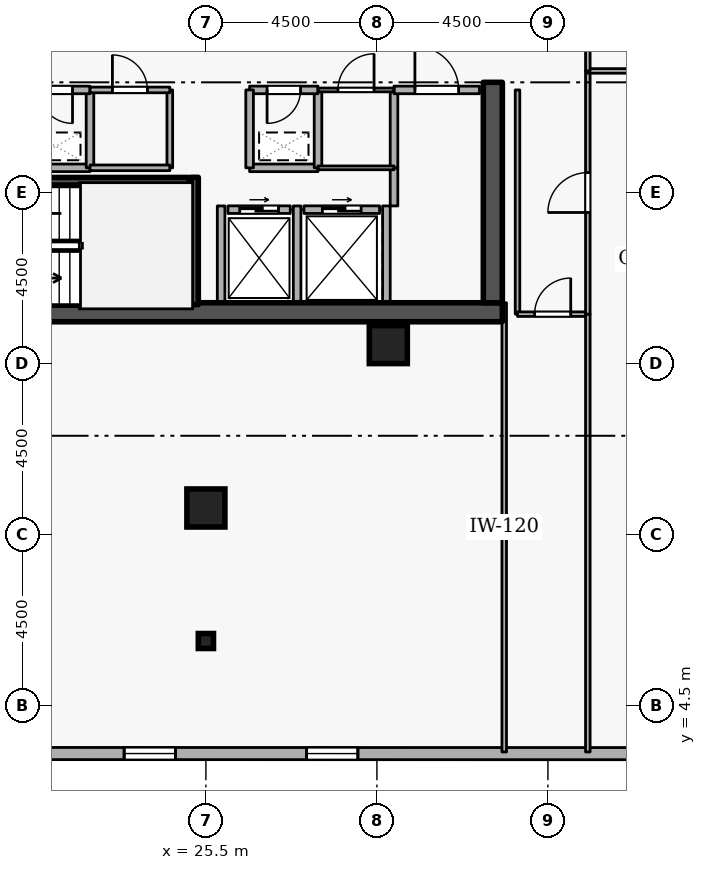
"""IFC4 building model, lengths in metres.
Left out: names, types, materials, properties, quantities, classifications, styles, units other than length and angle.
Written with IfcOpenShell. Run it as: python <this file> out.ifc"""

import sys

from ifc_helpers import new_model, si_unit, direction, frame, frame_2d, origin, origin_2d, place, context, subcontext, project, spatial, rectangle, i_section, extrude, element, fill, save


model = new_model("IFC4")
c1 = context("Model", 3, precision=1e-05, world=origin(), true_north=direction((0.0, 1.0)))
c2 = subcontext(c1, "Body", "Model", "MODEL_VIEW")
j1 = project(units=[si_unit("LENGTHUNIT", "METRE"), si_unit("PLANEANGLEUNIT", "RADIAN")], contexts=[c1])
p1 = place(None, origin())
s1 = spatial("IfcSite", under=j1, at=p1, CompositionType="ELEMENT")
p2 = place(p1, origin())
s2 = spatial("IfcBuilding", under=s1, at=p2, CompositionType="ELEMENT")
p3 = place(p2, frame((0.0, 0.0, 251.1)))
s3 = spatial("IfcBuildingStorey", under=s2, at=p3, CompositionType="ELEMENT", Elevation=251.1)
p4 = place(p3, frame((17.7, 14.85, 0.0), z_axis=(0.0, 0.0, 1.0), x_axis=(1.0, 0.0, 0.0)))
e1 = element("IfcWall", 1, at=p4, inside=s3, PredefinedType="SHEAR", context=c2, shape_type="SweptSolid", body=[
    extrude(rectangle(XDim=15.6, YDim=0.5, at=frame_2d((7.8, 0.0))), origin(), (0.0, 0.0, 1.0), 3.6),
])
p5 = place(p3, frame((33.05, 15.1, 0.0), z_axis=(0.0, 0.0, 1.0), x_axis=(0.0, 1.0, 0.0)))
e2 = element("IfcWall", 2, at=p5, inside=s3, PredefinedType="SHEAR", context=c2, shape_type="SweptSolid", body=[
    extrude(rectangle(XDim=5.8, YDim=0.5, at=frame_2d((2.9, 0.0))), origin(), (0.0, 0.0, 1.0), 3.6),
])
for number, where, z_axis, x_axis in (
    (3, (25.5, 9.7, 0.0), (0.0, 0.0, 1.0), (1.0, 0.0, 0.0)),
    (4, (30.3, 14.0, 0.0), (0.0, 0.0, 1.0), (1.0, 0.0, 0.0)),
):
    element("IfcColumn", number, at=place(p3, frame(where, z_axis=z_axis, x_axis=x_axis)), inside=s3, PredefinedType="COLUMN", context=c2, shape_type="SweptSolid", body=[
        extrude(rectangle(XDim=1.0, YDim=1.0, at=origin_2d()), origin(), (0.0, 0.0, 1.0), 3.6),
    ])
p6 = place(p3, frame((25.5, 6.2, 0.0), z_axis=(0.0, 0.0, 1.0), x_axis=(1.0, 0.0, 0.0)))
e5 = element("IfcColumn", 5, at=p6, inside=s3, PredefinedType="COLUMN", context=c2, shape_type="SweptSolid", body=[
    extrude(i_section(OverallWidth=0.399, OverallDepth=0.394, WebThickness=0.023, FlangeThickness=0.037, FilletRadius=0.015, at=origin_2d()), origin(), (0.0, 0.0, 1.0), 3.6),
])
p7 = place(p3, frame((6.249, 3.242, 0.0), z_axis=(0.0, 0.0, 1.0), x_axis=(0.999999983007, -0.000184351399, 0.0)))
e6 = element("IfcWall", 6, at=p7, inside=s3, PredefinedType="STANDARD", context=c2, shape_type="SweptSolid", body=[
    extrude(rectangle(XDim=34.432, YDim=0.32, at=frame_2d((17.216, 0.0))), origin(), (0.0, 0.0, 1.0), 2.22),
])
p8 = place(p7, frame((2.7, 0.0, 0.72)))
e7 = element("IfcOpeningElement", 7, at=p8, cuts=e6, PredefinedType="OPENING", context=c2, shape_type="SweptSolid", body=[
    extrude(rectangle(XDim=1.35, YDim=1.05, at=frame_2d((0.675, 0.525))), frame((0.0, 0.17, 0.0), z_axis=(0.0, -1.0, 0.0), x_axis=(1.0, 0.0, 0.0)), (0.0, 0.0, 1.0), 0.34),
])
p9 = place(p7, frame((12.3, 0.0, 0.72)))
e8 = element("IfcOpeningElement", 8, at=p9, cuts=e6, PredefinedType="OPENING", context=c2, shape_type="SweptSolid", body=[
    extrude(rectangle(XDim=1.35, YDim=1.05, at=frame_2d((0.675, 0.525))), frame((0.0, 0.17, 0.0), z_axis=(0.0, -1.0, 0.0), x_axis=(1.0, 0.0, 0.0)), (0.0, 0.0, 1.0), 0.34),
])
p10 = place(p7, frame((17.1, 0.0, 0.72)))
e9 = element("IfcOpeningElement", 9, at=p10, cuts=e6, PredefinedType="OPENING", context=c2, shape_type="SweptSolid", body=[
    extrude(rectangle(XDim=1.35, YDim=1.05, at=frame_2d((0.675, 0.525))), frame((0.0, 0.17, 0.0), z_axis=(0.0, -1.0, 0.0), x_axis=(1.0, 0.0, 0.0)), (0.0, 0.0, 1.0), 0.34),
])
p11 = place(p7, frame((21.9, 0.0, 0.72)))
e10 = element("IfcOpeningElement", 10, at=p11, cuts=e6, PredefinedType="OPENING", context=c2, shape_type="SweptSolid", body=[
    extrude(rectangle(XDim=1.35, YDim=1.05, at=frame_2d((0.675, 0.525))), frame((0.0, 0.17, 0.0), z_axis=(0.0, -1.0, 0.0), x_axis=(1.0, 0.0, 0.0)), (0.0, 0.0, 1.0), 0.34),
])
p12 = place(p3, frame((26.08, 17.55, 0.0), z_axis=(0.0, 0.0, 1.0), x_axis=(1.0, 0.0, 0.0)))
e11 = element("IfcWall", 11, at=p12, inside=s3, PredefinedType="STANDARD", context=c2, shape_type="SweptSolid", body=[
    extrude(rectangle(XDim=1.64, YDim=0.2, at=frame_2d((0.82, 0.0))), origin(), (0.0, 0.0, 1.0), 3.32),
])
p13 = place(p12, frame((0.31, 0.0, 0.0)))
e12 = element("IfcOpeningElement", 12, at=p13, cuts=e11, PredefinedType="OPENING", context=c2, shape_type="SweptSolid", body=[
    extrude(rectangle(XDim=1.02, YDim=2.06, at=frame_2d((0.51, 1.03))), frame((0.0, 0.11, 0.0), z_axis=(0.0, -1.0, 0.0), x_axis=(1.0, 0.0, 0.0)), (0.0, 0.0, 1.0), 0.22),
])
p14 = place(p3, frame((28.08, 17.55, 0.0), z_axis=(0.0, 0.0, 1.0), x_axis=(1.0, 0.0, 0.0)))
e13 = element("IfcWall", 13, at=p14, inside=s3, PredefinedType="STANDARD", context=c2, shape_type="SweptSolid", body=[
    extrude(rectangle(XDim=1.99, YDim=0.2, at=frame_2d((0.995, 0.0))), origin(), (0.0, 0.0, 1.0), 3.32),
])
p15 = place(p14, frame((0.485, 0.0, 0.0)))
e14 = element("IfcOpeningElement", 14, at=p15, cuts=e13, PredefinedType="OPENING", context=c2, shape_type="SweptSolid", body=[
    extrude(rectangle(XDim=1.02, YDim=2.06, at=frame_2d((0.51, 1.03))), frame((0.0, 0.11, 0.0), z_axis=(0.0, -1.0, 0.0), x_axis=(1.0, 0.0, 0.0)), (0.0, 0.0, 1.0), 0.22),
])
p16 = place(p3, frame((27.9, 15.112, 0.0), z_axis=(0.0, 0.0, 1.0), x_axis=(0.0, 1.0, 0.0)))
e15 = element("IfcWall", 15, at=p16, inside=s3, PredefinedType="STANDARD", context=c2, shape_type="SweptSolid", body=[
    extrude(rectangle(XDim=2.536, YDim=0.2, at=frame_2d((1.268, 0.0))), origin(), (0.0, 0.0, 1.0), 3.32),
])
p17 = place(p3, frame((25.9, 15.112, 0.0), z_axis=(0.0, 0.0, 1.0), x_axis=(0.0, 1.0, 0.0)))
e16 = element("IfcWall", 16, at=p17, inside=s3, PredefinedType="STANDARD", context=c2, shape_type="SweptSolid", body=[
    extrude(rectangle(XDim=2.536, YDim=0.2, at=frame_2d((1.268, 0.0))), origin(), (0.0, 0.0, 1.0), 1.785),
])
p18 = place(p3, frame((30.25, 15.112, 0.0), z_axis=(0.0, 0.0, 1.0), x_axis=(0.0, 1.0, 0.0)))
e17 = element("IfcWall", 17, at=p18, inside=s3, PredefinedType="STANDARD", context=c2, shape_type="SweptSolid", body=[
    extrude(rectangle(XDim=2.536, YDim=0.2, at=frame_2d((1.268, 0.0))), origin(), (0.0, 0.0, 1.0), 3.32),
])
p19 = place(p3, frame((25.2, 18.4, 0.0), z_axis=(0.0, 0.0, 1.0), x_axis=(0.0, -1.0, 0.0)))
e18 = element("IfcWall", 18, at=p19, inside=s3, PredefinedType="SHEAR", context=c2, shape_type="SweptSolid", body=[
    extrude(rectangle(XDim=3.35, YDim=0.2, at=frame_2d((1.675, 0.0))), origin(), (0.0, 0.0, 1.0), 3.6),
])
p20 = place(p3, frame((25.05, 18.297, 0.0), z_axis=(0.0, 0.0, 1.0), x_axis=(-1.0, 0.0, 0.0)))
e19 = element("IfcWall", 19, at=p20, inside=s3, PredefinedType="SHEAR", context=c2, shape_type="SweptSolid", body=[
    extrude(rectangle(XDim=7.1, YDim=0.2, at=frame_2d((3.55, 0.0))), origin(), (0.0, 0.0, 1.0), 3.6),
])
p21 = place(p3, frame((26.65, 18.65, 0.0), z_axis=(0.0, 0.0, 1.0), x_axis=(1.0, 0.0, 0.0)))
e20 = element("IfcWall", 20, at=p21, inside=s3, PredefinedType="STANDARD", context=c2, shape_type="SweptSolid", body=[
    extrude(rectangle(XDim=1.8, YDim=0.2, at=frame_2d((0.9, 0.0))), origin(), (0.0, 0.0, 1.0), 3.32),
])
p22 = place(p3, frame((28.45, 18.65, 0.0), z_axis=(0.0, 0.0, 1.0), x_axis=(0.0, 1.0, 0.0)))
e21 = element("IfcWall", 21, at=p22, inside=s3, PredefinedType="STANDARD", context=c2, shape_type="SweptSolid", body=[
    extrude(rectangle(XDim=2.05, YDim=0.2, at=frame_2d((1.025, 0.0))), origin(), (0.0, 0.0, 1.0), 3.32),
])
p23 = place(p3, frame((28.45, 20.7, 0.0), z_axis=(0.0, 0.0, 1.0), x_axis=(-1.0, 0.0, 0.0)))
e22 = element("IfcWall", 22, at=p23, inside=s3, PredefinedType="STANDARD", context=c2, shape_type="SweptSolid", body=[
    extrude(rectangle(XDim=1.8, YDim=0.2, at=frame_2d((0.9, 0.0))), origin(), (0.0, 0.0, 1.0), 3.32),
])
p24 = place(p23, frame((0.46, 0.0, 0.0)))
e23 = element("IfcOpeningElement", 23, at=p24, cuts=e22, PredefinedType="OPENING", context=c2, shape_type="SweptSolid", body=[
    extrude(rectangle(XDim=0.88, YDim=2.04, at=frame_2d((0.44, 1.02))), frame((0.0, 0.11, 0.0), z_axis=(0.0, -1.0, 0.0), x_axis=(1.0, 0.0, 0.0)), (0.0, 0.0, 1.0), 0.22),
])
p25 = place(p3, frame((26.65, 20.7, 0.0), z_axis=(0.0, 0.0, 1.0), x_axis=(0.0, -1.0, 0.0)))
e24 = element("IfcWall", 24, at=p25, inside=s3, PredefinedType="STANDARD", context=c2, shape_type="SweptSolid", body=[
    extrude(rectangle(XDim=2.05, YDim=0.2, at=frame_2d((1.025, 0.0))), origin(), (0.0, 0.0, 1.0), 3.32),
])
p26 = place(p3, frame((20.65, 18.65, 0.0), z_axis=(0.0, 0.0, 1.0), x_axis=(1.0, 0.0, 0.0)))
e25 = element("IfcWall", 25, at=p26, inside=s3, PredefinedType="STANDARD", context=c2, shape_type="SweptSolid", body=[
    extrude(rectangle(XDim=1.8, YDim=0.2, at=frame_2d((0.9, 0.0))), origin(), (0.0, 0.0, 1.0), 3.32),
])
p27 = place(p3, frame((22.45, 18.65, 0.0), z_axis=(0.0, 0.0, 1.0), x_axis=(0.0, 1.0, 0.0)))
e26 = element("IfcWall", 26, at=p27, inside=s3, PredefinedType="STANDARD", context=c2, shape_type="SweptSolid", body=[
    extrude(rectangle(XDim=2.05, YDim=0.2, at=frame_2d((1.025, 0.0))), origin(), (0.0, 0.0, 1.0), 3.32),
])
p28 = place(p3, frame((22.45, 20.7, 0.0), z_axis=(0.0, 0.0, 1.0), x_axis=(-1.0, 0.0, 0.0)))
e27 = element("IfcWall", 27, at=p28, inside=s3, PredefinedType="STANDARD", context=c2, shape_type="SweptSolid", body=[
    extrude(rectangle(XDim=1.8, YDim=0.2, at=frame_2d((0.9, 0.0))), origin(), (0.0, 0.0, 1.0), 3.32),
])
p29 = place(p28, frame((0.46, 0.0, 0.0)))
e28 = element("IfcOpeningElement", 28, at=p29, cuts=e27, PredefinedType="OPENING", context=c2, shape_type="SweptSolid", body=[
    extrude(rectangle(XDim=0.88, YDim=2.04, at=frame_2d((0.44, 1.02))), frame((0.0, 0.11, 0.0), z_axis=(0.0, -1.0, 0.0), x_axis=(1.0, 0.0, 0.0)), (0.0, 0.0, 1.0), 0.22),
])
p30 = place(p3, frame((30.45, 17.648, 0.0), z_axis=(0.0, 0.0, 1.0), x_axis=(0.0, 1.0, 0.0)))
e29 = element("IfcWall", 29, at=p30, inside=s3, PredefinedType="STANDARD", context=c2, shape_type="SweptSolid", body=[
    extrude(rectangle(XDim=1.002, YDim=0.2, at=frame_2d((0.501, 0.0))), origin(), (0.0, 0.0, 1.0), 3.32),
])
p31 = place(p3, frame((30.45, 18.65, 0.0), z_axis=(0.0, 0.0, 1.0), x_axis=(0.0, 1.0, 0.0)))
e30 = element("IfcWall", 30, at=p31, inside=s3, PredefinedType="STANDARD", context=c2, shape_type="SweptSolid", body=[
    extrude(rectangle(XDim=2.05, YDim=0.2, at=frame_2d((1.025, 0.0))), origin(), (0.0, 0.0, 1.0), 3.32),
])
p32 = place(p3, frame((30.45, 20.7, 0.0), z_axis=(0.0, 0.0, 1.0), x_axis=(1.0, 0.0, 0.0)))
e31 = element("IfcWall", 31, at=p32, inside=s3, PredefinedType="STANDARD", context=c2, shape_type="SweptSolid", body=[
    extrude(rectangle(XDim=2.25, YDim=0.2, at=frame_2d((1.125, 0.0))), origin(), (0.0, 0.0, 1.0), 3.32),
])
p33 = place(p32, frame((0.55, 0.0, 0.0)))
e32 = element("IfcOpeningElement", 32, at=p33, cuts=e31, PredefinedType="OPENING", context=c2, shape_type="SweptSolid", body=[
    extrude(rectangle(XDim=1.15, YDim=2.1, at=frame_2d((0.575, 1.05))), frame((0.0, 0.11, 0.0), z_axis=(0.0, -1.0, 0.0), x_axis=(1.0, 0.0, 0.0)), (0.0, 0.0, 1.0), 0.22),
])
p34 = place(p3, frame((24.55, 20.7, 0.0), z_axis=(0.0, 0.0, 1.0), x_axis=(0.0, -1.0, 0.0)))
e33 = element("IfcWall", 33, at=p34, inside=s3, PredefinedType="PARTITIONING", context=c2, shape_type="SweptSolid", body=[
    extrude(rectangle(XDim=2.05, YDim=0.15, at=frame_2d((1.025, 0.0))), origin(), (0.0, 0.0, 1.0), 3.32),
])
p35 = place(p3, frame((24.55, 18.65, 0.0), z_axis=(0.0, 0.0, 1.0), x_axis=(-1.0, 0.0, 0.0)))
e34 = element("IfcWall", 34, at=p35, inside=s3, PredefinedType="PARTITIONING", context=c2, shape_type="SweptSolid", body=[
    extrude(rectangle(XDim=2.1, YDim=0.15, at=frame_2d((1.05, 0.0))), origin(), (0.0, 0.0, 1.0), 3.32),
])
p36 = place(p3, frame((22.45, 20.7, 0.0), z_axis=(0.0, 0.0, 1.0), x_axis=(1.0, 0.0, 0.0)))
e35 = element("IfcWall", 35, at=p36, inside=s3, PredefinedType="PARTITIONING", context=c2, shape_type="SweptSolid", body=[
    extrude(rectangle(XDim=2.1, YDim=0.15, at=frame_2d((1.05, 0.0))), origin(), (0.0, 0.0, 1.0), 3.32),
])
p37 = place(p36, frame((0.59, 0.0, 0.0)))
e36 = element("IfcOpeningElement", 36, at=p37, cuts=e35, PredefinedType="OPENING", context=c2, shape_type="SweptSolid", body=[
    extrude(rectangle(XDim=0.92, YDim=2.08, at=frame_2d((0.46, 1.04))), frame((0.0, 0.085, 0.0), z_axis=(0.0, -1.0, 0.0), x_axis=(1.0, 0.0, 0.0)), (0.0, 0.0, 1.0), 0.17),
])
p38 = place(p3, frame((30.45, 18.65, 0.0), z_axis=(0.0, 0.0, 1.0), x_axis=(-1.0, 0.0, 0.0)))
e37 = element("IfcWall", 37, at=p38, inside=s3, PredefinedType="PARTITIONING", context=c2, shape_type="SweptSolid", body=[
    extrude(rectangle(XDim=2.0, YDim=0.1, at=frame_2d((1.0, 0.0))), origin(), (0.0, 0.0, 1.0), 3.32),
])
p39 = place(p3, frame((28.45, 20.7, 0.0), z_axis=(0.0, 0.0, 1.0), x_axis=(1.0, 0.0, 0.0)))
e38 = element("IfcWall", 38, at=p39, inside=s3, PredefinedType="PARTITIONING", context=c2, shape_type="SweptSolid", body=[
    extrude(rectangle(XDim=2.0, YDim=0.1, at=frame_2d((1.0, 0.0))), origin(), (0.0, 0.0, 1.0), 3.32),
])
p40 = place(p39, frame((0.525, 0.0, 0.0)))
e39 = element("IfcOpeningElement", 39, at=p40, cuts=e38, PredefinedType="OPENING", context=c2, shape_type="SweptSolid", body=[
    extrude(rectangle(XDim=0.95, YDim=2.1, at=frame_2d((0.475, 1.05))), frame((0.0, 0.06, 0.0), z_axis=(0.0, -1.0, 0.0), x_axis=(1.0, 0.0, 0.0)), (0.0, 0.0, 1.0), 0.12),
])
p41 = place(p3, frame((33.7, 20.7, 0.0), z_axis=(0.0, 0.0, 1.0), x_axis=(0.0, -1.0, 0.0)))
e40 = element("IfcWall", 40, at=p41, inside=s3, PredefinedType="PARTITIONING", context=c2, shape_type="SweptSolid", body=[
    extrude(rectangle(XDim=5.9, YDim=0.12, at=frame_2d((2.95, 0.0))), origin(), (0.0, 0.0, 1.0), 3.32),
])
p42 = place(p3, frame((33.7, 14.8, 0.0), z_axis=(0.0, 0.0, 1.0), x_axis=(1.0, 0.0, 0.0)))
e41 = element("IfcWall", 41, at=p42, inside=s3, PredefinedType="PARTITIONING", context=c2, shape_type="SweptSolid", body=[
    extrude(rectangle(XDim=1.85, YDim=0.12, at=frame_2d((0.925, 0.0))), origin(), (0.0, 0.0, 1.0), 3.32),
])
p43 = place(p42, frame((0.45, 0.0, 0.0)))
e42 = element("IfcOpeningElement", 42, at=p43, cuts=e41, PredefinedType="OPENING", context=c2, shape_type="SweptSolid", body=[
    extrude(rectangle(XDim=0.95, YDim=2.1, at=frame_2d((0.475, 1.05))), frame((0.0, 0.07, 0.0), z_axis=(0.0, -1.0, 0.0), x_axis=(1.0, 0.0, 0.0)), (0.0, 0.0, 1.0), 0.14),
])
p44 = place(p3, frame((35.55, 14.8, 0.0), z_axis=(0.0, 0.0, 1.0), x_axis=(0.0, -1.0, 0.0)))
e43 = element("IfcWall", 43, at=p44, inside=s3, PredefinedType="PARTITIONING", context=c2, shape_type="SweptSolid", body=[
    extrude(rectangle(XDim=11.52, YDim=0.12, at=frame_2d((5.76, 0.0))), origin(), (0.0, 0.0, 1.0), 3.32),
])
p45 = place(p3, frame((33.35, 3.28, 0.0), z_axis=(0.0, 0.0, 1.0), x_axis=(0.0, 1.0, 0.0)))
e44 = element("IfcWall", 44, at=p45, inside=s3, PredefinedType="PARTITIONING", context=c2, shape_type="SweptSolid", body=[
    extrude(rectangle(XDim=11.82, YDim=0.12, at=frame_2d((5.91, 0.0))), origin(), (0.0, 0.0, 1.0), 2.525),
])
p46 = place(p3, frame((35.55, 14.8, 0.0), z_axis=(0.0, 0.0, 1.0), x_axis=(0.0, 1.0, 0.0)))
e45 = element("IfcWall", 45, at=p46, inside=s3, PredefinedType="PARTITIONING", context=c2, shape_type="SweptSolid", body=[
    extrude(rectangle(XDim=6.4, YDim=0.12, at=frame_2d((3.2, 0.0))), origin(), (0.0, 0.0, 1.0), 3.32),
])
p47 = place(p46, frame((2.675, 0.0, 0.0)))
e46 = element("IfcOpeningElement", 46, at=p47, cuts=e45, PredefinedType="OPENING", context=c2, shape_type="SweptSolid", body=[
    extrude(rectangle(XDim=1.05, YDim=2.1, at=frame_2d((0.525, 1.05))), frame((0.0, 0.07, 0.0), z_axis=(0.0, -1.0, 0.0), x_axis=(1.0, 0.0, 0.0)), (0.0, 0.0, 1.0), 0.14),
])
p48 = place(p3, frame((35.55, 21.2, 0.0), z_axis=(0.0, 0.0, 1.0), x_axis=(1.0, 0.0, 0.0)))
e47 = element("IfcWall", 47, at=p48, inside=s3, PredefinedType="PARTITIONING", context=c2, shape_type="SweptSolid", body=[
    extrude(rectangle(XDim=7.67, YDim=0.12, at=frame_2d((3.835, 0.0))), origin(), (0.0, 0.0, 1.0), 3.32),
])
p49 = place(p3, frame((35.55, 21.2, 0.0), z_axis=(0.0, 0.0, 1.0), x_axis=(0.0, 1.0, 0.0)))
e48 = element("IfcWall", 48, at=p49, inside=s3, PredefinedType="PARTITIONING", context=c2, shape_type="SweptSolid", body=[
    extrude(rectangle(XDim=5.4, YDim=0.12, at=frame_2d((2.7, 0.0))), origin(), (0.0, 0.0, 1.0), 3.32),
])
p50 = place(p49, frame((2.225, 0.0, 0.0)))
e49 = element("IfcOpeningElement", 49, at=p50, cuts=e48, PredefinedType="OPENING", context=c2, shape_type="SweptSolid", body=[
    extrude(rectangle(XDim=0.95, YDim=2.1, at=frame_2d((0.475, 1.05))), frame((0.0, 0.07, 0.0), z_axis=(0.0, -1.0, 0.0), x_axis=(1.0, 0.0, 0.0)), (0.0, 0.0, 1.0), 0.14),
])
p51 = place(p10, origin())
e50 = element("IfcWindow", 50, at=p51, inside=s3, PartitioningType="SINGLE_PANEL", PredefinedType="WINDOW", context=c2, shape_type="SweptSolid", body=[
    extrude(rectangle(XDim=1.35, YDim=1.05, at=frame_2d((0.675, 0.525))), frame((0.0, 0.03, 0.0), z_axis=(0.0, -1.0, 0.0), x_axis=(1.0, 0.0, 0.0)), (0.0, 0.0, 1.0), 0.06),
])
fill(e9, e50)
p52 = place(p11, origin())
e51 = element("IfcWindow", 51, at=p52, inside=s3, PartitioningType="SINGLE_PANEL", PredefinedType="WINDOW", context=c2, shape_type="SweptSolid", body=[
    extrude(rectangle(XDim=1.35, YDim=1.05, at=frame_2d((0.675, 0.525))), frame((0.0, 0.03, 0.0), z_axis=(0.0, -1.0, 0.0), x_axis=(1.0, 0.0, 0.0)), (0.0, 0.0, 1.0), 0.06),
])
fill(e10, e51)
p53 = place(p13, origin())
e52 = element("IfcDoor", 52, at=p53, inside=s3, OperationType="SLIDING_TO_LEFT", PredefinedType="DOOR", context=c2, shape_type="SweptSolid", body=[
    extrude(rectangle(XDim=1.02, YDim=2.06, at=frame_2d((0.51, 1.03))), frame((0.0, 0.025, 0.0), z_axis=(0.0, -1.0, 0.0), x_axis=(1.0, 0.0, 0.0)), (0.0, 0.0, 1.0), 0.05),
])
fill(e12, e52)
p54 = place(p15, origin())
e53 = element("IfcDoor", 53, at=p54, inside=s3, OperationType="SLIDING_TO_LEFT", PredefinedType="DOOR", context=c2, shape_type="SweptSolid", body=[
    extrude(rectangle(XDim=1.02, YDim=2.06, at=frame_2d((0.51, 1.03))), frame((0.0, 0.025, 0.0), z_axis=(0.0, -1.0, 0.0), x_axis=(1.0, 0.0, 0.0)), (0.0, 0.0, 1.0), 0.05),
])
fill(e14, e53)
p55 = place(p24, origin())
e54 = element("IfcDoor", 54, at=p55, inside=s3, OperationType="SINGLE_SWING_RIGHT", PredefinedType="DOOR", context=c2, shape_type="SweptSolid", body=[
    extrude(rectangle(XDim=0.88, YDim=2.04, at=frame_2d((0.44, 1.02))), frame((0.0, 0.025, 0.0), z_axis=(0.0, -1.0, 0.0), x_axis=(1.0, 0.0, 0.0)), (0.0, 0.0, 1.0), 0.05),
])
fill(e23, e54)
p56 = place(p29, origin())
e55 = element("IfcDoor", 55, at=p56, inside=s3, OperationType="SINGLE_SWING_LEFT", PredefinedType="DOOR", context=c2, shape_type="SweptSolid", body=[
    extrude(rectangle(XDim=0.88, YDim=2.04, at=frame_2d((0.44, 1.02))), frame((0.0, 0.025, 0.0), z_axis=(0.0, -1.0, 0.0), x_axis=(1.0, 0.0, 0.0)), (0.0, 0.0, 1.0), 0.05),
])
fill(e28, e55)
p57 = place(p37, origin())
e56 = element("IfcDoor", 56, at=p57, inside=s3, OperationType="SINGLE_SWING_LEFT", PredefinedType="DOOR", context=c2, shape_type="SweptSolid", body=[
    extrude(rectangle(XDim=0.92, YDim=2.08, at=frame_2d((0.46, 1.04))), frame((0.0, 0.025, 0.0), z_axis=(0.0, -1.0, 0.0), x_axis=(1.0, 0.0, 0.0)), (0.0, 0.0, 1.0), 0.05),
])
fill(e36, e56)
p58 = place(p40, origin())
e57 = element("IfcDoor", 57, at=p58, inside=s3, OperationType="SINGLE_SWING_RIGHT", PredefinedType="DOOR", context=c2, shape_type="SweptSolid", body=[
    extrude(rectangle(XDim=0.95, YDim=2.1, at=frame_2d((0.475, 1.05))), frame((0.0, 0.025, 0.0), z_axis=(0.0, -1.0, 0.0), x_axis=(1.0, 0.0, 0.0)), (0.0, 0.0, 1.0), 0.05),
])
fill(e39, e57)
p59 = place(p33, origin())
e58 = element("IfcDoor", 58, at=p59, inside=s3, OperationType="SINGLE_SWING_LEFT", PredefinedType="DOOR", context=c2, shape_type="SweptSolid", body=[
    extrude(rectangle(XDim=1.15, YDim=2.1, at=frame_2d((0.575, 1.05))), frame((0.0, 0.025, 0.0), z_axis=(0.0, -1.0, 0.0), x_axis=(1.0, 0.0, 0.0)), (0.0, 0.0, 1.0), 0.05),
])
fill(e32, e58)
p60 = place(p43, origin())
e59 = element("IfcDoor", 59, at=p60, inside=s3, OperationType="SINGLE_SWING_RIGHT", PredefinedType="DOOR", context=c2, shape_type="SweptSolid", body=[
    extrude(rectangle(XDim=0.95, YDim=2.1, at=frame_2d((0.475, 1.05))), frame((0.0, 0.025, 0.0), z_axis=(0.0, -1.0, 0.0), x_axis=(1.0, 0.0, 0.0)), (0.0, 0.0, 1.0), 0.05),
])
fill(e42, e59)
p61 = place(p47, origin())
e60 = element("IfcDoor", 60, at=p61, inside=s3, OperationType="SINGLE_SWING_LEFT", PredefinedType="DOOR", context=c2, shape_type="SweptSolid", body=[
    extrude(rectangle(XDim=1.05, YDim=2.1, at=frame_2d((0.525, 1.05))), frame((0.0, 0.025, 0.0), z_axis=(0.0, -1.0, 0.0), x_axis=(1.0, 0.0, 0.0)), (0.0, 0.0, 1.0), 0.05),
])
fill(e46, e60)
save(model, sys.argv[1])
